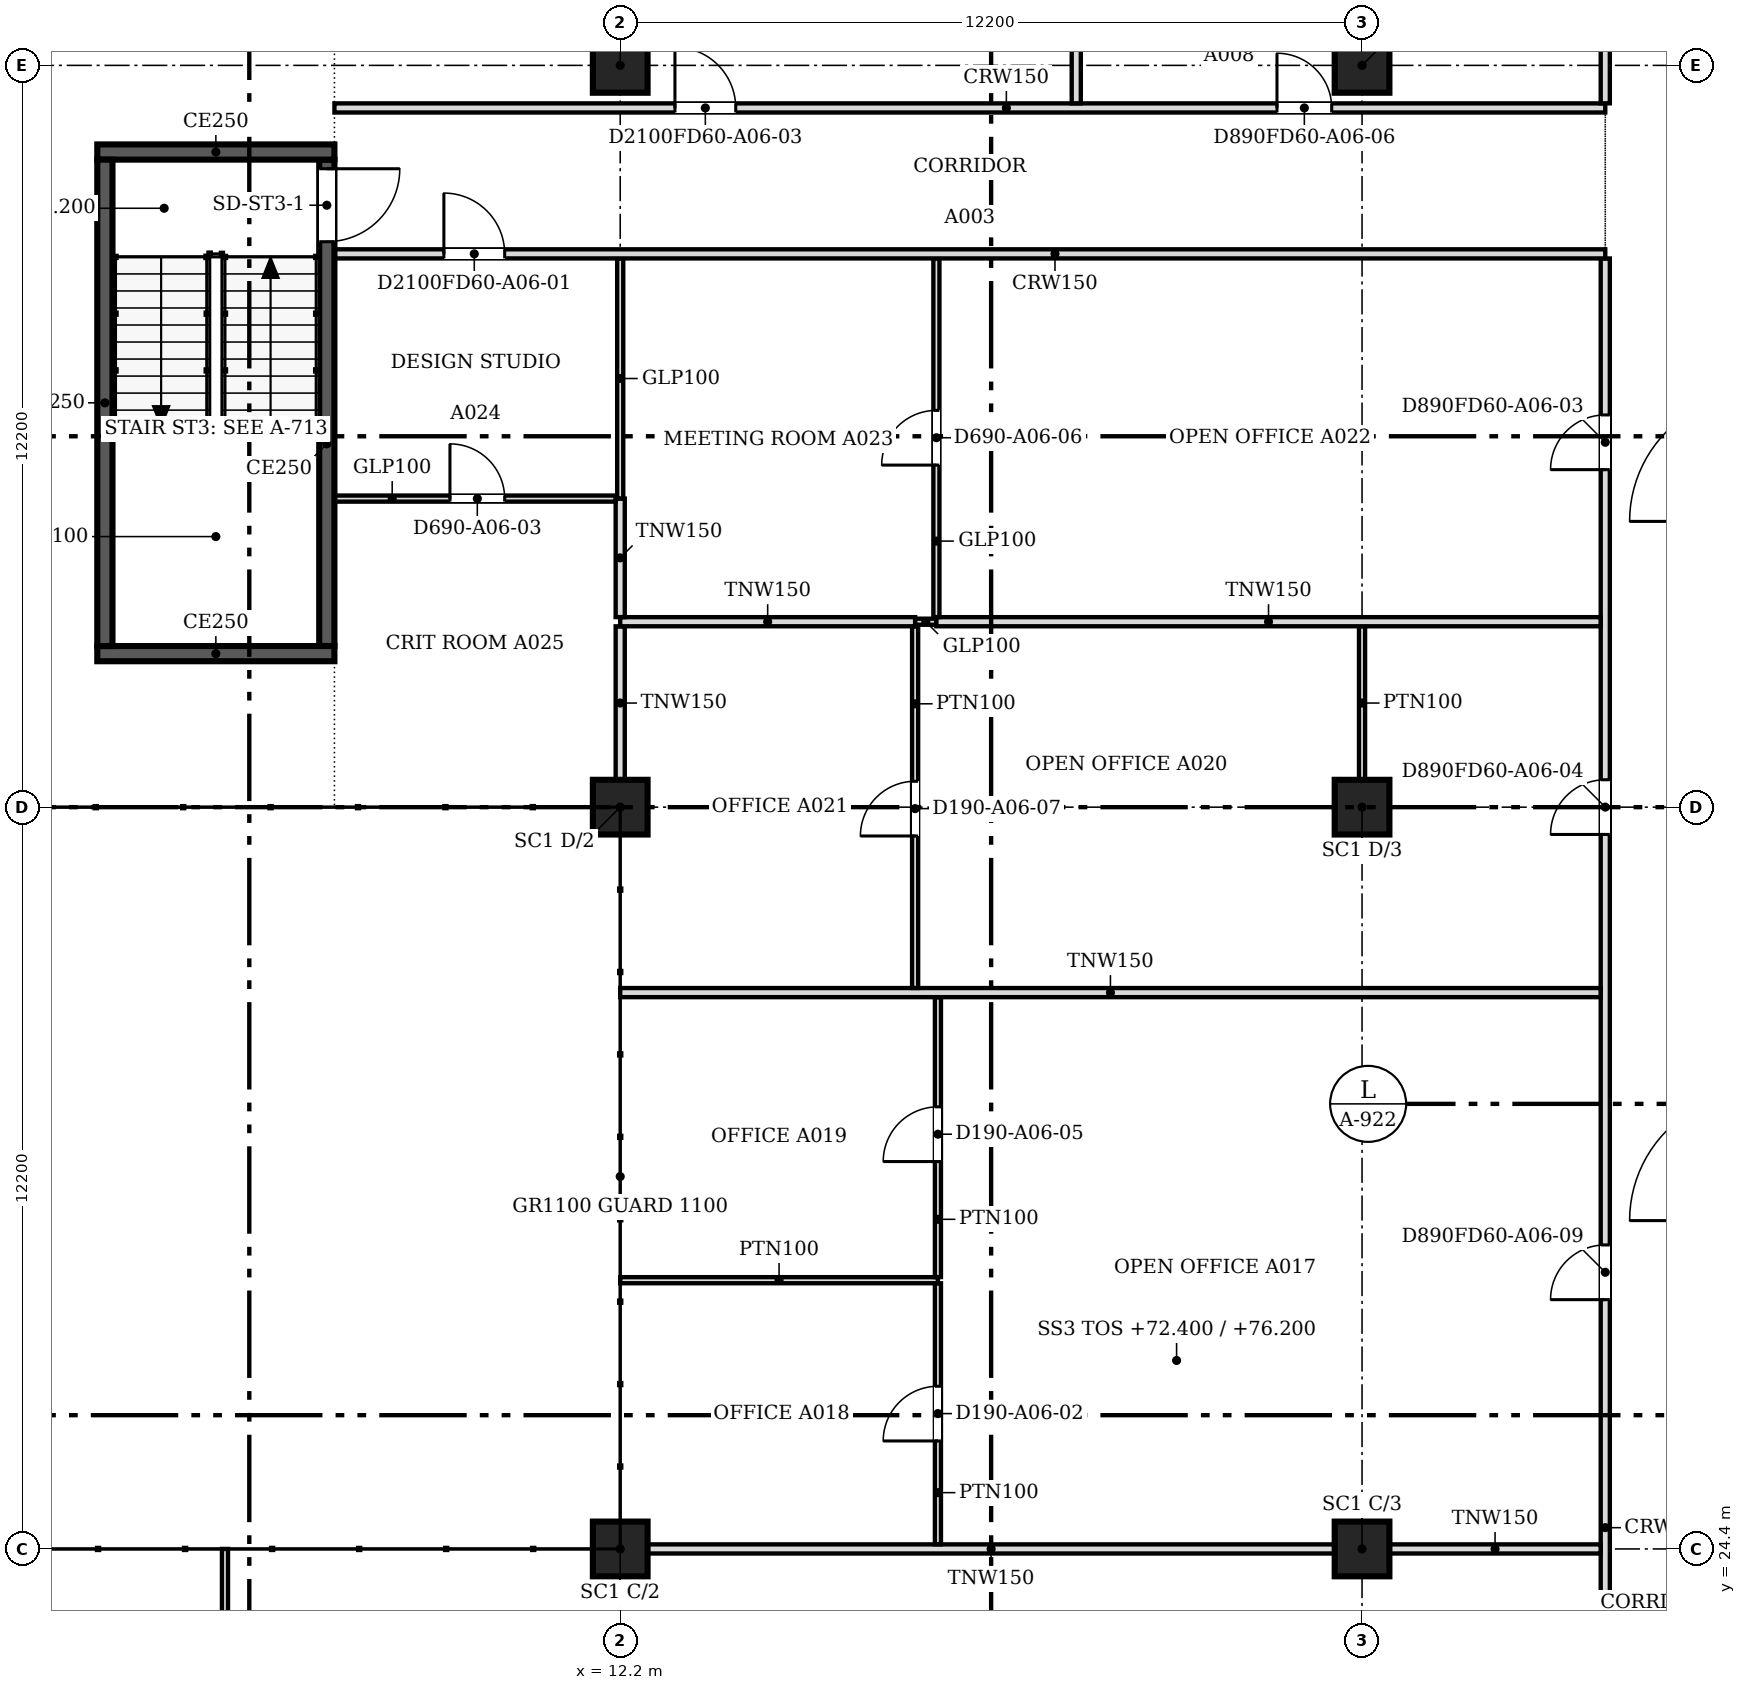
"""IFC4 building model, lengths in metres.
Left out: names, types, materials, properties, quantities, classifications, styles, units other than length and angle.
Written with IfcOpenShell. Run it as: python <this file> out.ifc"""

import sys

from ifc_helpers import new_model, si_unit, direction, frame, frame_2d, origin, origin_2d, place, context, subcontext, project, spatial, rectangle, extrude, source, transform, mapped, element, fill, save


model = new_model("IFC4")
c1 = context("Model", 3, precision=1e-05, world=origin(), true_north=direction((0.0, 1.0)))
c2 = subcontext(c1, "Body", "Model", "MODEL_VIEW")
j1 = project(units=[si_unit("LENGTHUNIT", "METRE"), si_unit("PLANEANGLEUNIT", "RADIAN")], contexts=[c1])
p1 = place(None, origin())
s1 = spatial("IfcSite", under=j1, at=p1, CompositionType="ELEMENT")
p2 = place(p1, origin())
s2 = spatial("IfcBuilding", under=s1, at=p2, CompositionType="ELEMENT")
p3 = place(p2, frame((0.0, 0.0, 72.4)))
s3 = spatial("IfcBuildingStorey", under=s2, at=p3, CompositionType="ELEMENT", Elevation=72.4)
for number, where, z_axis, x_axis in (
    (1, (12.2, 24.4, 0.0), (0.0, 0.0, 1.0), (1.0, 0.0, 0.0)),
    (2, (12.2, 36.6, 0.0), (0.0, 0.0, 1.0), (1.0, 0.0, 0.0)),
    (3, (12.2, 48.8, 0.0), (0.0, 0.0, 1.0), (1.0, 0.0, 0.0)),
    (4, (24.4, 24.4, 0.0), (0.0, 0.0, 1.0), (1.0, 0.0, 0.0)),
    (5, (24.4, 36.6, 0.0), (0.0, 0.0, 1.0), (1.0, 0.0, 0.0)),
    (6, (24.4, 48.8, 0.0), (0.0, 0.0, 1.0), (1.0, 0.0, 0.0)),
):
    element("IfcColumn", number, at=place(p3, frame(where, z_axis=z_axis, x_axis=x_axis)), inside=s3, PredefinedType="COLUMN", context=c2, shape_type="SweptSolid", body=[
        extrude(rectangle(XDim=0.9, YDim=0.9, at=origin_2d()), origin(), (0.0, 0.0, 1.0), 3.6),
    ])
p4 = place(p3, frame((7.5, 39.125, 0.0), z_axis=(0.0, 0.0, 1.0), x_axis=(-1.0, 0.0, 0.0)))
e7 = element("IfcWall", 7, at=p4, inside=s3, PredefinedType="SOLIDWALL", context=c2, shape_type="SweptSolid", body=[
    extrude(rectangle(XDim=3.9, YDim=0.25, at=frame_2d((1.95, 0.0))), origin(), (0.0, 0.0, 1.0), 3.8),
])
p5 = place(p3, frame((3.725, 39.25, 0.0), z_axis=(0.0, 0.0, 1.0), x_axis=(0.0, 1.0, 0.0)))
e8 = element("IfcWall", 8, at=p5, inside=s3, PredefinedType="SOLIDWALL", context=c2, shape_type="SweptSolid", body=[
    extrude(rectangle(XDim=8.0, YDim=0.25, at=frame_2d((4.0, 0.0))), origin(), (0.0, 0.0, 1.0), 3.8),
])
p6 = place(p3, frame((3.6, 47.375, 0.0), z_axis=(0.0, 0.0, 1.0), x_axis=(1.0, 0.0, 0.0)))
e9 = element("IfcWall", 9, at=p6, inside=s3, PredefinedType="SOLIDWALL", context=c2, shape_type="SweptSolid", body=[
    extrude(rectangle(XDim=3.9, YDim=0.25, at=frame_2d((1.95, 0.0))), origin(), (0.0, 0.0, 1.0), 3.8),
])
p7 = place(p3, frame((7.375, 47.25, 0.0), z_axis=(0.0, 0.0, 1.0), x_axis=(0.0, -1.0, 0.0)))
e10 = element("IfcWall", 10, at=p7, inside=s3, PredefinedType="SOLIDWALL", context=c2, shape_type="SweptSolid", body=[
    extrude(rectangle(XDim=8.0, YDim=0.25, at=frame_2d((4.0, 0.0))), origin(), (0.0, 0.0, 1.0), 3.8),
])
m1 = source(origin(), c2, "Body", "SweptSolid", [
    extrude(rectangle(XDim=1.2, YDim=2.1, at=frame_2d((0.6, 1.05))), frame((0.0, 0.135, 0.0), z_axis=(0.0, -1.0, 0.0), x_axis=(1.0, 0.0, 0.0)), (0.0, 0.0, 1.0), 0.27),
])
p8 = place(p7, frame((0.15, 0.0, 0.0)))
e11 = element("IfcOpeningElement", 11, at=p8, cuts=e10, PredefinedType="OPENING", context=c2, shape_type="MappedRepresentation", body=[
    mapped(m1, transform((0.0, 0.0, 0.0), scale=1.0)),
])
p9 = place(p3, frame((28.4, 18.8, 0.0), z_axis=(0.0, 0.0, 1.0), x_axis=(0.0, 1.0, 0.0)))
e12 = element("IfcWall", 12, at=p9, inside=s3, PredefinedType="PARTITIONING", context=c2, shape_type="SweptSolid", body=[
    extrude(rectangle(XDim=26.824, YDim=0.15, at=frame_2d((13.412, 0.0))), origin(), (0.0, 0.0, 1.0), 3.067),
])
m2 = source(origin(), c2, "Body", "SweptSolid", [
    extrude(rectangle(XDim=0.9, YDim=2.1, at=frame_2d((0.45, 1.05))), frame((0.0, 0.085, 0.0), z_axis=(0.0, -1.0, 0.0), x_axis=(1.0, 0.0, 0.0)), (0.0, 0.0, 1.0), 0.17),
])
p10 = place(p9, frame((1.3, 0.0, 0.0)))
e13 = element("IfcOpeningElement", 13, at=p10, cuts=e12, PredefinedType="OPENING", context=c2, shape_type="MappedRepresentation", body=[
    mapped(m2, transform((0.0, 0.0, 0.0), scale=1.0)),
])
p11 = place(p9, frame((23.351, 0.0, 0.0)))
e14 = element("IfcOpeningElement", 14, at=p11, cuts=e12, PredefinedType="OPENING", context=c2, shape_type="MappedRepresentation", body=[
    mapped(m2, transform((0.0, 0.0, 0.0), scale=1.0)),
])
p12 = place(p9, frame((17.351, 0.0, 0.0)))
e15 = element("IfcOpeningElement", 15, at=p12, cuts=e12, PredefinedType="OPENING", context=c2, shape_type="MappedRepresentation", body=[
    mapped(m2, transform((0.0, 0.0, 0.0), scale=1.0)),
])
p13 = place(p9, frame((9.7, 0.0, 0.0)))
e16 = element("IfcOpeningElement", 16, at=p13, cuts=e12, PredefinedType="OPENING", context=c2, shape_type="MappedRepresentation", body=[
    mapped(m2, transform((0.0, 0.0, 0.0), scale=1.0)),
])
p14 = place(p3, frame((5.7, 18.99, 0.0), z_axis=(0.0, 0.0, 1.0), x_axis=(0.0, 1.0, 0.0)))
e17 = element("IfcWall", 17, at=p14, inside=s3, PredefinedType="PARTITIONING", context=c2, shape_type="SweptSolid", body=[
    extrude(rectangle(XDim=5.41, YDim=0.1, at=frame_2d((2.705, 0.0))), origin(), (0.0, 0.0, 1.0), 3.067),
])
m3 = source(origin(), c2, "Body", "SweptSolid", [
    extrude(rectangle(XDim=0.9, YDim=2.1, at=frame_2d((0.45, 1.05))), frame((0.0, 0.06, 0.0), z_axis=(0.0, -1.0, 0.0), x_axis=(1.0, 0.0, 0.0)), (0.0, 0.0, 1.0), 0.12),
])
p15 = place(p14, frame((2.3, 0.0, 0.0)))
e18 = element("IfcOpeningElement", 18, at=p15, cuts=e17, PredefinedType="OPENING", context=c2, shape_type="MappedRepresentation", body=[
    mapped(m3, transform((0.0, 0.0, 0.0), scale=1.0)),
])
p16 = place(p3, frame((12.651, 24.4, 0.0), z_axis=(0.0, 0.0, 1.0), x_axis=(1.0, 0.0, 0.0)))
e19 = element("IfcWall", 19, at=p16, inside=s3, PredefinedType="PARTITIONING", context=c2, shape_type="SweptSolid", body=[
    extrude(rectangle(XDim=11.298, YDim=0.15, at=frame_2d((5.649, 0.0))), origin(), (0.0, 0.0, 1.0), 3.067),
])
p17 = place(p3, frame((24.851, 24.4, 0.0), z_axis=(0.0, 0.0, 1.0), x_axis=(1.0, 0.0, 0.0)))
e20 = element("IfcWall", 20, at=p17, inside=s3, PredefinedType="PARTITIONING", context=c2, shape_type="SweptSolid", body=[
    extrude(rectangle(XDim=3.473, YDim=0.15, at=frame_2d((1.736, 0.0))), origin(), (0.0, 0.0, 1.0), 3.067),
])
p18 = place(p3, frame((17.425, 24.476, 0.0), z_axis=(0.0, 0.0, 1.0), x_axis=(0.0, 1.0, 0.0)))
e21 = element("IfcWall", 21, at=p18, inside=s3, PredefinedType="PARTITIONING", context=c2, shape_type="SweptSolid", body=[
    extrude(rectangle(XDim=4.293, YDim=0.1, at=frame_2d((2.146, 0.0))), origin(), (0.0, 0.0, 1.0), 3.067),
])
p19 = place(p18, frame((1.7, 0.0, 0.0)))
e22 = element("IfcOpeningElement", 22, at=p19, cuts=e21, PredefinedType="OPENING", context=c2, shape_type="MappedRepresentation", body=[
    mapped(m3, transform((0.0, 0.0, 0.0), scale=1.0)),
])
p20 = place(p3, frame((12.2, 28.82, 0.0), z_axis=(0.0, 0.0, 1.0), x_axis=(1.0, 0.0, 0.0)))
e23 = element("IfcWall", 23, at=p20, inside=s3, PredefinedType="PARTITIONING", context=c2, shape_type="SweptSolid", body=[
    extrude(rectangle(XDim=5.225, YDim=0.1, at=frame_2d((2.613, 0.0))), origin(), (0.0, 0.0, 1.0), 3.067),
])
p21 = place(p3, frame((17.425, 28.871, 0.0), z_axis=(0.0, 0.0, 1.0), x_axis=(0.0, 1.0, 0.0)))
e24 = element("IfcWall", 24, at=p21, inside=s3, PredefinedType="PARTITIONING", context=c2, shape_type="SweptSolid", body=[
    extrude(rectangle(XDim=4.603, YDim=0.1, at=frame_2d((2.301, 0.0))), origin(), (0.0, 0.0, 1.0), 3.067),
])
p22 = place(p21, frame((1.9, 0.0, 0.0)))
e25 = element("IfcOpeningElement", 25, at=p22, cuts=e24, PredefinedType="OPENING", context=c2, shape_type="MappedRepresentation", body=[
    mapped(m3, transform((0.0, 0.0, 0.0), scale=1.0)),
])
p23 = place(p3, frame((12.2, 33.55, 0.0), z_axis=(0.0, 0.0, 1.0), x_axis=(1.0, 0.0, 0.0)))
e26 = element("IfcWall", 26, at=p23, inside=s3, PredefinedType="PARTITIONING", context=c2, shape_type="SweptSolid", body=[
    extrude(rectangle(XDim=16.124, YDim=0.15, at=frame_2d((8.062, 0.0))), origin(), (0.0, 0.0, 1.0), 3.067),
])
p24 = place(p3, frame((17.05, 33.626, 0.0), z_axis=(0.0, 0.0, 1.0), x_axis=(0.0, 1.0, 0.0)))
e27 = element("IfcWall", 27, at=p24, inside=s3, PredefinedType="PARTITIONING", context=c2, shape_type="SweptSolid", body=[
    extrude(rectangle(XDim=5.948, YDim=0.1, at=frame_2d((2.974, 0.0))), origin(), (0.0, 0.0, 1.0), 3.067),
])
p25 = place(p24, frame((2.5, 0.0, 0.0)))
e28 = element("IfcOpeningElement", 28, at=p25, cuts=e27, PredefinedType="OPENING", context=c2, shape_type="MappedRepresentation", body=[
    mapped(m3, transform((0.0, 0.0, 0.0), scale=1.0)),
])
p26 = place(p3, frame((12.2, 37.051, 0.0), z_axis=(0.0, 0.0, 1.0), x_axis=(0.0, 1.0, 0.0)))
e29 = element("IfcWall", 29, at=p26, inside=s3, PredefinedType="PARTITIONING", context=c2, shape_type="SweptSolid", body=[
    extrude(rectangle(XDim=2.523, YDim=0.15, at=frame_2d((1.261, 0.0))), origin(), (0.0, 0.0, 1.0), 3.067),
])
p27 = place(p3, frame((24.4, 37.05, 0.0), z_axis=(0.0, 0.0, 1.0), x_axis=(0.0, 1.0, 0.0)))
e30 = element("IfcWall", 30, at=p27, inside=s3, PredefinedType="PARTITIONING", context=c2, shape_type="SweptSolid", body=[
    extrude(rectangle(XDim=2.525, YDim=0.1, at=frame_2d((1.262, 0.0))), origin(), (0.0, 0.0, 1.0), 3.067),
])
p28 = place(p3, frame((12.2, 39.65, 0.0), z_axis=(0.0, 0.0, 1.0), x_axis=(1.0, 0.0, 0.0)))
e31 = element("IfcWall", 31, at=p28, inside=s3, PredefinedType="PARTITIONING", context=c2, shape_type="SweptSolid", body=[
    extrude(rectangle(XDim=4.85, YDim=0.15, at=frame_2d((2.425, 0.0))), origin(), (0.0, 0.0, 1.0), 3.067),
])
p29 = place(p3, frame((17.051, 39.65, 0.0), z_axis=(0.0, 0.0, 1.0), x_axis=(1.0, 0.0, 0.0)))
e32 = element("IfcWall", 32, at=p29, inside=s3, PredefinedType="PARTITIONING", context=c2, shape_type="SweptSolid", body=[
    extrude(rectangle(XDim=0.348, YDim=0.1, at=frame_2d((0.174, 0.0))), origin(), (0.0, 0.0, 1.0), 3.067),
])
p30 = place(p3, frame((17.4, 39.65, 0.0), z_axis=(0.0, 0.0, 1.0), x_axis=(1.0, 0.0, 0.0)))
e33 = element("IfcWall", 33, at=p30, inside=s3, PredefinedType="PARTITIONING", context=c2, shape_type="SweptSolid", body=[
    extrude(rectangle(XDim=10.924, YDim=0.15, at=frame_2d((5.462, 0.0))), origin(), (0.0, 0.0, 1.0), 3.067),
])
p31 = place(p3, frame((12.2, 39.726, 0.0), z_axis=(0.0, 0.0, 1.0), x_axis=(0.0, 1.0, 0.0)))
e34 = element("IfcWall", 34, at=p31, inside=s3, PredefinedType="PARTITIONING", context=c2, shape_type="SweptSolid", body=[
    extrude(rectangle(XDim=1.949, YDim=0.15, at=frame_2d((0.975, 0.0))), origin(), (0.0, 0.0, 1.0), 3.067),
])
p32 = place(p3, frame((17.4, 39.726, 0.0), z_axis=(0.0, 0.0, 1.0), x_axis=(0.0, 1.0, 0.0)))
e35 = element("IfcWall", 35, at=p32, inside=s3, PredefinedType="PARTITIONING", context=c2, shape_type="SweptSolid", body=[
    extrude(rectangle(XDim=5.898, YDim=0.1, at=frame_2d((2.949, 0.0))), origin(), (0.0, 0.0, 1.0), 3.067),
])
p33 = place(p32, frame((2.5, 0.0, 0.0)))
e36 = element("IfcOpeningElement", 36, at=p33, cuts=e35, PredefinedType="OPENING", context=c2, shape_type="MappedRepresentation", body=[
    mapped(m3, transform((0.0, 0.0, 0.0), scale=1.0)),
])
p34 = place(p3, frame((12.124, 41.675, 0.0), z_axis=(0.0, 0.0, 1.0), x_axis=(-1.0, 0.0, 0.0)))
e37 = element("IfcWall", 37, at=p34, inside=s3, PredefinedType="PARTITIONING", context=c2, shape_type="SweptSolid", body=[
    extrude(rectangle(XDim=4.624, YDim=0.1, at=frame_2d((2.312, 0.0))), origin(), (0.0, 0.0, 1.0), 3.067),
])
p35 = place(p34, frame((1.824, 0.0, 0.0)))
e38 = element("IfcOpeningElement", 38, at=p35, cuts=e37, PredefinedType="OPENING", context=c2, shape_type="MappedRepresentation", body=[
    mapped(m3, transform((0.0, 0.0, 0.0), scale=1.0)),
])
p36 = place(p3, frame((12.2, 41.676, 0.0), z_axis=(0.0, 0.0, 1.0), x_axis=(0.0, 1.0, 0.0)))
e39 = element("IfcWall", 39, at=p36, inside=s3, PredefinedType="PARTITIONING", context=c2, shape_type="SweptSolid", body=[
    extrude(rectangle(XDim=3.948, YDim=0.1, at=frame_2d((1.974, 0.0))), origin(), (0.0, 0.0, 1.0), 3.067),
])
p37 = place(p3, frame((28.4, 45.7, 0.0), z_axis=(0.0, 0.0, 1.0), x_axis=(-1.0, 0.0, 0.0)))
e40 = element("IfcWall", 40, at=p37, inside=s3, PredefinedType="PARTITIONING", context=c2, shape_type="SweptSolid", body=[
    extrude(rectangle(XDim=20.9, YDim=0.15, at=frame_2d((10.45, 0.0))), origin(), (0.0, 0.0, 1.0), 3.067),
])
m4 = source(origin(), c2, "Body", "SweptSolid", [
    extrude(rectangle(XDim=1.0, YDim=2.1, at=frame_2d((0.5, 1.05))), frame((0.0, 0.085, 0.0), z_axis=(0.0, -1.0, 0.0), x_axis=(1.0, 0.0, 0.0)), (0.0, 0.0, 1.0), 0.17),
])
p38 = place(p37, frame((18.1, 0.0, 0.0)))
e41 = element("IfcOpeningElement", 41, at=p38, cuts=e40, PredefinedType="OPENING", context=c2, shape_type="MappedRepresentation", body=[
    mapped(m4, transform((0.0, 0.0, 0.0), scale=1.0)),
])
p39 = place(p3, frame((7.5, 48.1, 0.0), z_axis=(0.0, 0.0, 1.0), x_axis=(1.0, 0.0, 0.0)))
e42 = element("IfcWall", 42, at=p39, inside=s3, PredefinedType="PARTITIONING", context=c2, shape_type="SweptSolid", body=[
    extrude(rectangle(XDim=20.9, YDim=0.15, at=frame_2d((10.45, 0.0))), origin(), (0.0, 0.0, 1.0), 3.067),
])
p40 = place(p39, frame((15.501, 0.0, 0.0)))
e43 = element("IfcOpeningElement", 43, at=p40, cuts=e42, PredefinedType="OPENING", context=c2, shape_type="MappedRepresentation", body=[
    mapped(m2, transform((0.0, 0.0, 0.0), scale=1.0)),
])
p41 = place(p39, frame((5.6, 0.0, 0.0)))
e44 = element("IfcOpeningElement", 44, at=p41, cuts=e42, PredefinedType="OPENING", context=c2, shape_type="MappedRepresentation", body=[
    mapped(m4, transform((0.0, 0.0, 0.0), scale=1.0)),
])
p42 = place(p3, frame((19.7, 48.176, 0.0), z_axis=(0.0, 0.0, 1.0), x_axis=(0.0, 1.0, 0.0)))
e45 = element("IfcWall", 45, at=p42, inside=s3, PredefinedType="PARTITIONING", context=c2, shape_type="SweptSolid", body=[
    extrude(rectangle(XDim=6.224, YDim=0.15, at=frame_2d((3.112, 0.0))), origin(), (0.0, 0.0, 1.0), 3.067),
])
p43 = place(p3, frame((28.4, 48.176, 0.0), z_axis=(0.0, 0.0, 1.0), x_axis=(0.0, 1.0, 0.0)))
e46 = element("IfcWall", 46, at=p43, inside=s3, PredefinedType="PARTITIONING", context=c2, shape_type="SweptSolid", body=[
    extrude(rectangle(XDim=2.648, YDim=0.15, at=frame_2d((1.324, 0.0))), origin(), (0.0, 0.0, 1.0), 3.067),
])
m5 = source(origin(), c2, "Body", "SweptSolid", [
    extrude(rectangle(XDim=1.2, YDim=2.1, at=frame_2d((0.6, 1.05))), frame((0.0, 0.025, 0.0), z_axis=(0.0, -1.0, 0.0), x_axis=(1.0, 0.0, 0.0)), (0.0, 0.0, 1.0), 0.05),
])
p44 = place(p8, origin())
e47 = element("IfcDoor", 47, at=p44, inside=s3, OperationType="SINGLE_SWING_LEFT", PredefinedType="DOOR", context=c2, shape_type="MappedRepresentation", body=[
    mapped(m5, transform((0.0, 0.0, 0.0), scale=1.0)),
])
fill(e11, e47)
m6 = source(origin(), c2, "Body", "SweptSolid", [
    extrude(rectangle(XDim=0.9, YDim=2.1, at=frame_2d((0.45, 1.05))), frame((0.0, 0.025, 0.0), z_axis=(0.0, -1.0, 0.0), x_axis=(1.0, 0.0, 0.0)), (0.0, 0.0, 1.0), 0.05),
])
p45 = place(p19, origin())
e48 = element("IfcDoor", 48, at=p45, inside=s3, OperationType="SINGLE_SWING_LEFT", PredefinedType="DOOR", context=c2, shape_type="MappedRepresentation", body=[
    mapped(m6, transform((0.0, 0.0, 0.0), scale=1.0)),
])
fill(e22, e48)
p46 = place(p22, origin())
e49 = element("IfcDoor", 49, at=p46, inside=s3, OperationType="SINGLE_SWING_LEFT", PredefinedType="DOOR", context=c2, shape_type="MappedRepresentation", body=[
    mapped(m6, transform((0.0, 0.0, 0.0), scale=1.0)),
])
fill(e25, e49)
p47 = place(p35, origin())
e50 = element("IfcDoor", 50, at=p47, inside=s3, OperationType="SINGLE_SWING_RIGHT", PredefinedType="DOOR", context=c2, shape_type="MappedRepresentation", body=[
    mapped(m6, transform((0.0, 0.0, 0.0), scale=1.0)),
])
fill(e38, e50)
m7 = source(origin(), c2, "Body", "SweptSolid", [
    extrude(rectangle(XDim=1.0, YDim=2.1, at=frame_2d((0.5, 1.05))), frame((0.0, 0.025, 0.0), z_axis=(0.0, -1.0, 0.0), x_axis=(1.0, 0.0, 0.0)), (0.0, 0.0, 1.0), 0.05),
])
p48 = place(p38, origin())
e51 = element("IfcDoor", 51, at=p48, inside=s3, OperationType="SINGLE_SWING_RIGHT", PredefinedType="DOOR", context=c2, shape_type="MappedRepresentation", body=[
    mapped(m7, transform((0.0, 0.0, 0.0), scale=1.0)),
])
fill(e41, e51)
p49 = place(p33, origin())
e52 = element("IfcDoor", 52, at=p49, inside=s3, OperationType="SINGLE_SWING_LEFT", PredefinedType="DOOR", context=c2, shape_type="MappedRepresentation", body=[
    mapped(m6, transform((0.0, 0.0, 0.0), scale=1.0)),
])
fill(e36, e52)
p50 = place(p25, origin())
e53 = element("IfcDoor", 53, at=p50, inside=s3, OperationType="SINGLE_SWING_LEFT", PredefinedType="DOOR", context=c2, shape_type="MappedRepresentation", body=[
    mapped(m6, transform((0.0, 0.0, 0.0), scale=1.0)),
])
fill(e28, e53)
p51 = place(p11, origin())
e54 = element("IfcDoor", 54, at=p51, inside=s3, OperationType="SINGLE_SWING_LEFT", PredefinedType="DOOR", context=c2, shape_type="MappedRepresentation", body=[
    mapped(m6, transform((0.0, 0.0, 0.0), scale=1.0)),
])
fill(e14, e54)
p52 = place(p12, origin())
e55 = element("IfcDoor", 55, at=p52, inside=s3, OperationType="SINGLE_SWING_LEFT", PredefinedType="DOOR", context=c2, shape_type="MappedRepresentation", body=[
    mapped(m6, transform((0.0, 0.0, 0.0), scale=1.0)),
])
fill(e15, e55)
p53 = place(p40, origin())
e56 = element("IfcDoor", 56, at=p53, inside=s3, OperationType="SINGLE_SWING_LEFT", PredefinedType="DOOR", context=c2, shape_type="MappedRepresentation", body=[
    mapped(m6, transform((0.0, 0.0, 0.0), scale=1.0)),
])
fill(e43, e56)
p54 = place(p13, origin())
e57 = element("IfcDoor", 57, at=p54, inside=s3, OperationType="SINGLE_SWING_LEFT", PredefinedType="DOOR", context=c2, shape_type="MappedRepresentation", body=[
    mapped(m6, transform((0.0, 0.0, 0.0), scale=1.0)),
])
fill(e16, e57)
p55 = place(p41, origin())
e58 = element("IfcDoor", 58, at=p55, inside=s3, OperationType="SINGLE_SWING_LEFT", PredefinedType="DOOR", context=c2, shape_type="MappedRepresentation", body=[
    mapped(m7, transform((0.0, 0.0, 0.0), scale=1.0)),
])
fill(e44, e58)
save(model, sys.argv[1])
